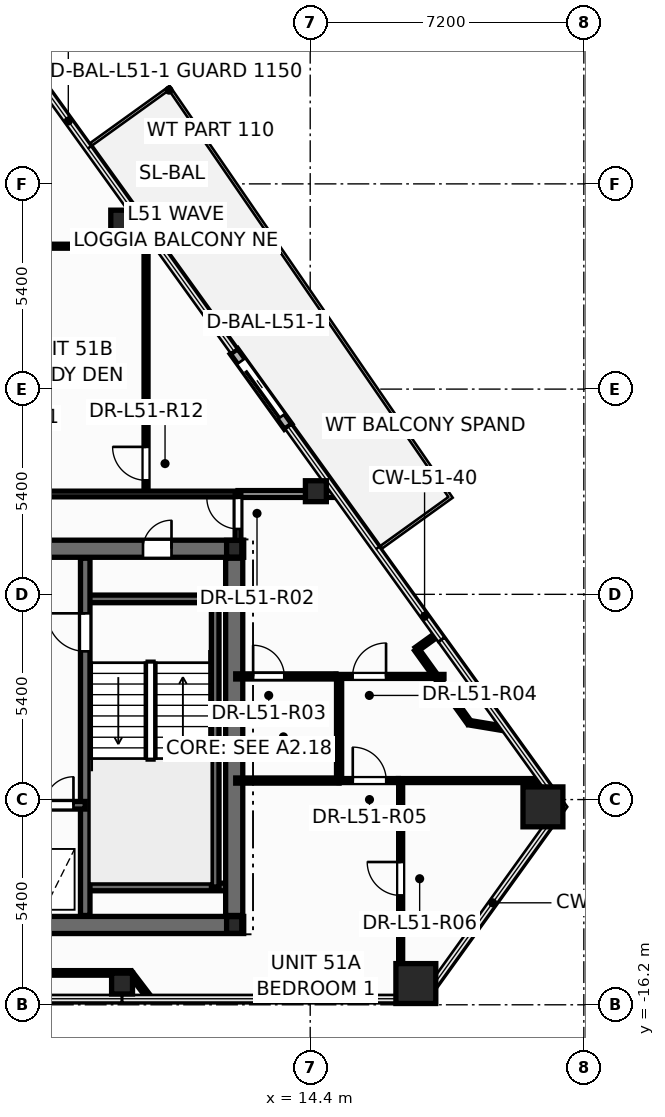
"""IFC4 building model, lengths in metres.
Left out: names, types, materials, properties, quantities, classifications, styles, units other than length and angle.
Written with IfcOpenShell. Run it as: python <this file> out.ifc"""

import sys

from ifc_helpers import new_model, si_unit, direction, frame, frame_2d, origin, origin_2d, place, context, subcontext, project, spatial, rectangle, hollow_rectangle, hollow_circle, i_section, extrude, element, fill, save


model = new_model("IFC4")
c1 = context("Model", 3, precision=1e-05, world=origin(), true_north=direction((0.0, 1.0)))
c2 = subcontext(c1, "Body", "Model", "MODEL_VIEW")
j1 = project(units=[si_unit("LENGTHUNIT", "METRE"), si_unit("PLANEANGLEUNIT", "RADIAN")], contexts=[c1])
p1 = place(None, origin())
s1 = spatial("IfcSite", under=j1, at=p1, CompositionType="ELEMENT")
p2 = place(p1, origin())
s2 = spatial("IfcBuilding", under=s1, at=p2, CompositionType="ELEMENT")
p3 = place(p2, frame((0.0, 0.0, 196.5)))
s3 = spatial("IfcBuildingStorey", under=s2, at=p3, CompositionType="ELEMENT", Elevation=196.5)
for number, where, z_axis, x_axis in (
    (1, (17.18, -15.641, 0.0), (0.0, 0.0, 1.0), (1.0, 0.0, 0.0)),
    (2, (20.524, -10.992, 0.0), (0.0, 0.0, 1.0), (1.0, 0.0, 0.0)),
):
    element("IfcColumn", number, at=place(p3, frame(where, z_axis=z_axis, x_axis=x_axis)), inside=s3, PredefinedType="COLUMN", context=c2, shape_type="SweptSolid", body=[
        extrude(hollow_rectangle(XDim=1.05, YDim=1.05, WallThickness=0.045, at=origin_2d()), origin(), (0.0, 0.0, 1.0), 3.6),
    ])
for number, where, z_axis, x_axis in (
    (3, (9.449, -15.641, 0.0), (0.0, 0.0, 1.0), (1.0, 0.0, 0.0)),
    (4, (14.549, -2.686, 0.0), (0.0, 0.0, 1.0), (1.0, 0.0, 0.0)),
    (5, (9.427, 4.433, 0.0), (0.0, 0.0, 1.0), (1.0, 0.0, 0.0)),
):
    element("IfcColumn", number, at=place(p3, frame(where, z_axis=z_axis, x_axis=x_axis)), inside=s3, PredefinedType="COLUMN", context=c2, shape_type="SweptSolid", body=[
        extrude(hollow_circle(Radius=0.275, WallThickness=0.024, at=origin_2d()), origin(), (0.0, 0.0, 1.0), 3.6),
    ])
for number, where, z_axis, x_axis in (
    (6, (12.4, -14.1, 0.0), (0.0, 0.0, 1.0), (1.0, 0.0, 0.0)),
    (7, (12.4, -4.2, 0.0), (0.0, 0.0, 1.0), (1.0, 0.0, 0.0)),
):
    element("IfcColumn", number, at=place(p3, frame(where, z_axis=z_axis, x_axis=x_axis)), inside=s3, PredefinedType="COLUMN", context=c2, shape_type="SweptSolid", body=[
        extrude(i_section(OverallWidth=0.4, OverallDepth=0.44, WebThickness=0.028, FlangeThickness=0.04, at=origin_2d()), origin(), (0.0, 0.0, 1.0), 3.6),
    ])
p4 = place(p3, frame((13.819, -0.987, -0.015), z_axis=(0.0, 0.0, 1.0), x_axis=(-0.583951454754, 0.811788579921, 0.0)))
e8 = element("IfcWall", 8, at=p4, inside=s3, PredefinedType="STANDARD", context=c2, shape_type="SweptSolid", body=[
    extrude(rectangle(XDim=2.44, YDim=0.24, at=frame_2d((1.22, 0.0))), origin(), (0.0, 0.0, 1.0), 2.807),
])
p5 = place(p4, frame((0.32, 0.0, 0.015)))
e9 = element("IfcOpeningElement", 9, at=p5, cuts=e8, PredefinedType="OPENING", context=c2, shape_type="SweptSolid", body=[
    extrude(rectangle(XDim=1.806, YDim=2.204, at=frame_2d((0.9, 1.102))), frame((0.0, 0.13, 0.0), z_axis=(0.0, -1.0, 0.0), x_axis=(1.0, 0.0, 0.0)), (0.0, 0.0, 1.0), 0.26),
])
p6 = place(p3, frame((-12.65, -14.1, 0.0), z_axis=(0.0, 0.0, 1.0), x_axis=(1.0, 0.0, 0.0)))
e10 = element("IfcWall", 10, at=p6, inside=s3, PredefinedType="SHEAR", context=c2, shape_type="SweptSolid", body=[
    extrude(rectangle(XDim=25.3, YDim=0.45, at=frame_2d((12.65, 0.0))), origin(), (0.0, 0.0, 1.0), 3.6),
])
p7 = place(p3, frame((-12.65, -4.2, 0.0), z_axis=(0.0, 0.0, 1.0), x_axis=(1.0, 0.0, 0.0)))
e11 = element("IfcWall", 11, at=p7, inside=s3, PredefinedType="SHEAR", context=c2, shape_type="SweptSolid", body=[
    extrude(rectangle(XDim=25.3, YDim=0.45, at=frame_2d((12.65, 0.0))), origin(), (0.0, 0.0, 1.0), 3.6),
])
p8 = place(p7, frame((1.85, 0.0, 0.0)))
e12 = element("IfcOpeningElement", 12, at=p8, cuts=e11, PredefinedType="OPENING", context=c2, shape_type="SweptSolid", body=[
    extrude(rectangle(XDim=0.756, YDim=2.054, at=frame_2d((0.375, 1.027))), frame((0.0, 0.235, 0.0), z_axis=(0.0, -1.0, 0.0), x_axis=(1.0, 0.0, 0.0)), (0.0, 0.0, 1.0), 0.47),
])
p9 = place(p7, frame((22.65, 0.0, 0.0)))
e13 = element("IfcOpeningElement", 13, at=p9, cuts=e11, PredefinedType="OPENING", context=c2, shape_type="SweptSolid", body=[
    extrude(rectangle(XDim=0.756, YDim=2.054, at=frame_2d((0.375, 1.027))), frame((0.0, 0.235, 0.0), z_axis=(0.0, -1.0, 0.0), x_axis=(1.0, 0.0, 0.0)), (0.0, 0.0, 1.0), 0.47),
])
p10 = place(p7, frame((5.85, 0.0, 0.0)))
e14 = element("IfcOpeningElement", 14, at=p10, cuts=e11, PredefinedType="OPENING", context=c2, shape_type="SweptSolid", body=[
    extrude(rectangle(XDim=1.006, YDim=2.104, at=frame_2d((0.5, 1.052))), frame((0.0, 0.235, 0.0), z_axis=(0.0, -1.0, 0.0), x_axis=(1.0, 0.0, 0.0)), (0.0, 0.0, 1.0), 0.47),
])
p11 = place(p7, frame((10.35, 0.0, 0.0)))
e15 = element("IfcOpeningElement", 15, at=p11, cuts=e11, PredefinedType="OPENING", context=c2, shape_type="SweptSolid", body=[
    extrude(rectangle(XDim=1.406, YDim=2.154, at=frame_2d((0.7, 1.077))), frame((0.0, 0.235, 0.0), z_axis=(0.0, -1.0, 0.0), x_axis=(1.0, 0.0, 0.0)), (0.0, 0.0, 1.0), 0.47),
])
p12 = place(p7, frame((18.45, 0.0, 0.0)))
e16 = element("IfcOpeningElement", 16, at=p12, cuts=e11, PredefinedType="OPENING", context=c2, shape_type="SweptSolid", body=[
    extrude(rectangle(XDim=1.006, YDim=2.104, at=frame_2d((0.5, 1.052))), frame((0.0, 0.235, 0.0), z_axis=(0.0, -1.0, 0.0), x_axis=(1.0, 0.0, 0.0)), (0.0, 0.0, 1.0), 0.47),
])
for number, where, z_axis, x_axis in (
    (17, (8.48, -5.52, 0.0), (0.0, 0.0, 1.0), (1.0, 0.0, 0.0)),
    (18, (8.48, -13.1, 0.0), (0.0, 0.0, 1.0), (1.0, 0.0, 0.0)),
):
    element("IfcWall", number, at=place(p3, frame(where, z_axis=z_axis, x_axis=x_axis)), inside=s3, PredefinedType="SOLIDWALL", context=c2, shape_type="SweptSolid", body=[
        extrude(rectangle(XDim=3.87, YDim=0.2, at=frame_2d((1.935, 0.0))), origin(), (0.0, 0.0, 1.0), 3.6),
    ])
p13 = place(p3, frame((11.9, -13.1, 0.0), z_axis=(0.0, 0.0, 1.0), x_axis=(0.0, 1.0, 0.0)))
e19 = element("IfcWall", 19, at=p13, inside=s3, PredefinedType="SOLIDWALL", context=c2, shape_type="SweptSolid", body=[
    extrude(rectangle(XDim=7.58, YDim=0.2, at=frame_2d((3.79, 0.0))), origin(), (0.0, 0.0, 1.0), 3.6),
])
p14 = place(p3, frame((8.48, -13.85, 0.0), z_axis=(0.0, 0.0, 1.0), x_axis=(0.0, 1.0, 0.0)))
e20 = element("IfcWall", 20, at=p14, inside=s3, PredefinedType="SHEAR", context=c2, shape_type="SweptSolid", body=[
    extrude(rectangle(XDim=9.4, YDim=0.25, at=frame_2d((4.7, 0.0))), origin(), (0.0, 0.0, 1.0), 3.6),
])
p15 = place(p14, frame((6.95, 0.0, 0.0)))
e21 = element("IfcOpeningElement", 21, at=p15, cuts=e20, PredefinedType="OPENING", context=c2, shape_type="SweptSolid", body=[
    extrude(rectangle(XDim=1.006, YDim=2.104, at=frame_2d((0.5, 1.052))), frame((0.0, 0.135, 0.0), z_axis=(0.0, -1.0, 0.0), x_axis=(1.0, 0.0, 0.0)), (0.0, 0.0, 1.0), 0.27),
])
p16 = place(p3, frame((5.12, -10.95, 0.0), z_axis=(0.0, 0.0, 1.0), x_axis=(1.0, 0.0, 0.0)))
e22 = element("IfcWall", 22, at=p16, inside=s3, PredefinedType="SOLIDWALL", context=c2, shape_type="SweptSolid", body=[
    extrude(rectangle(XDim=3.36, YDim=0.2, at=frame_2d((1.68, 0.0))), origin(), (0.0, 0.0, 1.0), 3.6),
])
p17 = place(p16, frame((0.42, 0.0, 0.0)))
e23 = element("IfcOpeningElement", 23, at=p17, cuts=e22, PredefinedType="OPENING", context=c2, shape_type="SweptSolid", body=[
    extrude(rectangle(XDim=1.106, YDim=2.104, at=frame_2d((0.55, 1.052))), frame((0.0, 0.11, 0.0), z_axis=(0.0, -1.0, 0.0), x_axis=(1.0, 0.0, 0.0)), (0.0, 0.0, 1.0), 0.22),
])
p18 = place(p16, frame((2.3, 0.0, 0.0)))
e24 = element("IfcOpeningElement", 24, at=p18, cuts=e22, PredefinedType="OPENING", context=c2, shape_type="SweptSolid", body=[
    extrude(rectangle(XDim=0.756, YDim=2.054, at=frame_2d((0.375, 1.027))), frame((0.0, 0.11, 0.0), z_axis=(0.0, -1.0, 0.0), x_axis=(1.0, 0.0, 0.0)), (0.0, 0.0, 1.0), 0.22),
])
p19 = place(p3, frame((12.4, -13.85, 0.0), z_axis=(0.0, 0.0, 1.0), x_axis=(0.0, 1.0, 0.0)))
e25 = element("IfcWall", 25, at=p19, inside=s3, PredefinedType="SHEAR", context=c2, shape_type="SweptSolid", body=[
    extrude(rectangle(XDim=9.4, YDim=0.45, at=frame_2d((4.7, 0.0))), origin(), (0.0, 0.0, 1.0), 3.6),
])
p20 = place(p3, frame((10.08, -2.76, 0.0), z_axis=(0.0, 0.0, 1.0), x_axis=(0.0, 1.0, 0.0)))
e26 = element("IfcWall", 26, at=p20, inside=s3, PredefinedType="PARTITIONING", context=c2, shape_type="SweptSolid", body=[
    extrude(rectangle(XDim=6.971, YDim=0.105, at=frame_2d((3.485, 0.0))), origin(), (0.0, 0.0, 1.0), 2.625),
])
p21 = place(p20, frame((0.36, 0.0, 0.0)))
e27 = element("IfcOpeningElement", 27, at=p21, cuts=e26, PredefinedType="OPENING", context=c2, shape_type="SweptSolid", body=[
    extrude(rectangle(XDim=0.886, YDim=2.104, at=frame_2d((0.44, 1.052))), frame((0.0, 0.062, 0.0), z_axis=(0.0, -1.0, 0.0), x_axis=(1.0, 0.0, 0.0)), (0.0, 0.0, 1.0), 0.125),
])
p22 = place(p3, frame((16.78, -16.041, 0.0), z_axis=(0.0, 0.0, 1.0), x_axis=(0.0, 1.0, 0.0)))
e28 = element("IfcWall", 28, at=p22, inside=s3, PredefinedType="PARTITIONING", context=c2, shape_type="SweptSolid", body=[
    extrude(rectangle(XDim=5.741, YDim=0.105, at=frame_2d((2.871, 0.0))), origin(), (0.0, 0.0, 1.0), 2.792),
])
p23 = place(p22, frame((2.718, 0.0, 0.0)))
e29 = element("IfcOpeningElement", 29, at=p23, cuts=e28, PredefinedType="OPENING", context=c2, shape_type="SweptSolid", body=[
    extrude(rectangle(XDim=0.886, YDim=2.104, at=frame_2d((0.44, 1.052))), frame((0.0, 0.062, 0.0), z_axis=(0.0, -1.0, 0.0), x_axis=(1.0, 0.0, 0.0)), (0.0, 0.0, 1.0), 0.125),
])
p24 = place(p3, frame((2.76, 3.76, 0.0), z_axis=(0.0, 0.0, 1.0), x_axis=(1.0, 0.0, 0.0)))
e30 = element("IfcWall", 30, at=p24, inside=s3, PredefinedType="PARTITIONING", context=c2, shape_type="SweptSolid", body=[
    extrude(rectangle(XDim=7.644, YDim=0.105, at=frame_2d((3.822, 0.0))), origin(), (0.0, 0.0, 1.0), 2.625),
])
p25 = place(p3, frame((5.822, -2.76, 0.0), z_axis=(0.0, 0.0, 1.0), x_axis=(1.0, 0.0, 0.0)))
e31 = element("IfcWall", 31, at=p25, inside=s3, PredefinedType="PARTITIONING", context=c2, shape_type="SweptSolid", body=[
    extrude(rectangle(XDim=6.678, YDim=0.15, at=frame_2d((3.339, 0.0))), origin(), (0.0, 0.0, 1.0), 2.325),
])
p26 = place(p3, frame((16.72, -10.3, 0.0), z_axis=(0.0, 0.0, 1.0), x_axis=(1.0, 0.0, 0.0)))
e32 = element("IfcWall", 32, at=p26, inside=s3, PredefinedType="PARTITIONING", context=c2, shape_type="SweptSolid", body=[
    extrude(rectangle(XDim=3.799, YDim=0.105, at=frame_2d((1.899, 0.0))), origin(), (0.0, 0.0, 1.0), 2.325),
])
p27 = place(p3, frame((5.958, -15.361, 0.0), z_axis=(0.0, 0.0, 1.0), x_axis=(1.0, 0.0, 0.0)))
e33 = element("IfcWall", 33, at=p27, inside=s3, PredefinedType="PARTITIONING", context=c2, shape_type="SweptSolid", body=[
    extrude(rectangle(XDim=3.711, YDim=0.12, at=frame_2d((1.855, 0.0))), origin(), (0.0, 0.0, 1.0), 2.792),
])
p28 = place(p3, frame((15.08, -7.56, 0.0), z_axis=(0.0, 0.0, 1.0), x_axis=(1.0, 0.0, 0.0)))
e34 = element("IfcWall", 34, at=p28, inside=s3, PredefinedType="PARTITIONING", context=c2, shape_type="SweptSolid", body=[
    extrude(rectangle(XDim=2.84, YDim=0.105, at=frame_2d((1.42, 0.0))), origin(), (0.0, 0.0, 1.0), 2.325),
])
p29 = place(p28, frame((0.436, 0.0, 0.0)))
e35 = element("IfcOpeningElement", 35, at=p29, cuts=e34, PredefinedType="OPENING", context=c2, shape_type="SweptSolid", body=[
    extrude(rectangle(XDim=0.886, YDim=2.104, at=frame_2d((0.44, 1.052))), frame((0.0, 0.062, 0.0), z_axis=(0.0, -1.0, 0.0), x_axis=(1.0, 0.0, 0.0)), (0.0, 0.0, 1.0), 0.125),
])
p30 = place(p3, frame((12.44, -7.56, 0.0), z_axis=(0.0, 0.0, 1.0), x_axis=(1.0, 0.0, 0.0)))
e36 = element("IfcWall", 36, at=p30, inside=s3, PredefinedType="PARTITIONING", context=c2, shape_type="SweptSolid", body=[
    extrude(rectangle(XDim=2.638, YDim=0.135, at=frame_2d((1.319, 0.0))), origin(), (0.0, 0.0, 1.0), 2.792),
])
p31 = place(p30, frame((0.458, 0.0, 0.0)))
e37 = element("IfcOpeningElement", 37, at=p31, cuts=e36, PredefinedType="OPENING", context=c2, shape_type="SweptSolid", body=[
    extrude(rectangle(XDim=0.826, YDim=2.104, at=frame_2d((0.41, 1.052))), frame((0.0, 0.078, 0.0), z_axis=(0.0, -1.0, 0.0), x_axis=(1.0, 0.0, 0.0)), (0.0, 0.0, 1.0), 0.155),
])
p32 = place(p3, frame((15.16, -10.3, 0.0), z_axis=(0.0, 0.0, 1.0), x_axis=(0.0, 1.0, 0.0)))
e38 = element("IfcWall", 38, at=p32, inside=s3, PredefinedType="PARTITIONING", context=c2, shape_type="SweptSolid", body=[
    extrude(rectangle(XDim=2.74, YDim=0.135, at=frame_2d((1.37, 0.0))), origin(), (0.0, 0.0, 1.0), 3.35),
])
p33 = place(p3, frame((12.44, -10.3, 0.0), z_axis=(0.0, 0.0, 1.0), x_axis=(1.0, 0.0, 0.0)))
e39 = element("IfcWall", 39, at=p33, inside=s3, PredefinedType="PARTITIONING", context=c2, shape_type="SweptSolid", body=[
    extrude(rectangle(XDim=2.72, YDim=0.135, at=frame_2d((1.36, 0.0))), origin(), (0.0, 0.0, 1.0), 2.792),
])
p34 = place(p3, frame((12.5, -2.76, 0.0), z_axis=(0.0, 0.0, 1.0), x_axis=(1.0, 0.0, 0.0)))
e40 = element("IfcWall", 40, at=p34, inside=s3, PredefinedType="PARTITIONING", context=c2, shape_type="SweptSolid", body=[
    extrude(rectangle(XDim=2.595, YDim=0.18, at=frame_2d((1.297, 0.0))), origin(), (0.0, 0.0, 1.0), 2.625),
])
p35 = place(p3, frame((18.586, -8.778, 0.0), z_axis=(0.0, 0.0, 1.0), x_axis=(-0.583963896956, 0.811779629611, 0.0)))
e41 = element("IfcWall", 41, at=p35, inside=s3, PredefinedType="PARTITIONING", context=c2, shape_type="SweptSolid", body=[
    extrude(rectangle(XDim=2.378, YDim=0.12, at=frame_2d((1.189, 0.0))), origin(), (0.0, 0.0, 1.0), 3.35),
])
p36 = place(p3, frame((15.16, -10.3, 0.0), z_axis=(0.0, 0.0, 1.0), x_axis=(1.0, 0.0, 0.0)))
e42 = element("IfcWall", 42, at=p36, inside=s3, PredefinedType="PARTITIONING", context=c2, shape_type="SweptSolid", body=[
    extrude(rectangle(XDim=1.558, YDim=0.105, at=frame_2d((0.779, 0.0))), origin(), (0.0, 0.0, 1.0), 3.35),
])
p37 = place(p36, frame((0.36, 0.0, 0.0)))
e43 = element("IfcOpeningElement", 43, at=p37, cuts=e42, PredefinedType="OPENING", context=c2, shape_type="SweptSolid", body=[
    extrude(rectangle(XDim=0.886, YDim=2.104, at=frame_2d((0.44, 1.052))), frame((0.0, 0.062, 0.0), z_axis=(0.0, -1.0, 0.0), x_axis=(1.0, 0.0, 0.0)), (0.0, 0.0, 1.0), 0.125),
])
p38 = place(p3, frame((12.5, -4.24, 0.0), z_axis=(0.0, 0.0, 1.0), x_axis=(0.0, 1.0, 0.0)))
e44 = element("IfcWall", 44, at=p38, inside=s3, PredefinedType="PARTITIONING", context=c2, shape_type="SweptSolid", body=[
    extrude(rectangle(XDim=1.48, YDim=0.15, at=frame_2d((0.74, 0.0))), origin(), (0.0, 0.0, 1.0), 2.325),
])
p39 = place(p38, frame((0.56, 0.0, 0.0)))
e45 = element("IfcOpeningElement", 45, at=p39, cuts=e44, PredefinedType="OPENING", context=c2, shape_type="SweptSolid", body=[
    extrude(rectangle(XDim=0.826, YDim=2.104, at=frame_2d((0.41, 1.052))), frame((0.0, 0.085, 0.0), z_axis=(0.0, -1.0, 0.0), x_axis=(1.0, 0.0, 0.0)), (0.0, 0.0, 1.0), 0.17),
])
p40 = place(p3, frame((19.424, -8.917, 0.0), z_axis=(0.0, 0.0, 1.0), x_axis=(-0.98640168839, 0.164352393172, 0.0)))
e46 = element("IfcWall", 46, at=p40, inside=s3, PredefinedType="PARTITIONING", context=c2, shape_type="SweptSolid", body=[
    extrude(rectangle(XDim=0.85, YDim=0.12, at=frame_2d((0.425, 0.0))), origin(), (0.0, 0.0, 1.0), 2.792),
])
p41 = place(p3, frame((9.669, -15.361, 0.0), z_axis=(0.0, 0.0, 1.0), x_axis=(0.605553776309, -0.795804388023, 0.0)))
e47 = element("IfcWall", 47, at=p41, inside=s3, PredefinedType="PARTITIONING", context=c2, shape_type="SweptSolid", body=[
    extrude(rectangle(XDim=0.842, YDim=0.12, at=frame_2d((0.421, 0.0))), origin(), (0.0, 0.0, 1.0), 2.792),
])
p42 = place(p3, frame((17.198, -6.847, 0.0), z_axis=(0.0, 0.0, 1.0), x_axis=(0.811783169955, 0.583958975423, 0.0)))
e48 = element("IfcWall", 48, at=p42, inside=s3, PredefinedType="PARTITIONING", context=c2, shape_type="SweptSolid", body=[
    extrude(rectangle(XDim=0.67, YDim=0.12, at=frame_2d((0.335, 0.0))), origin(), (0.0, 0.0, 1.0), 2.792),
])
p43 = place(p5, origin())
e49 = element("IfcDoor", 49, at=p43, inside=s3, OperationType="SLIDING_TO_LEFT", PredefinedType="DOOR", context=c2, shape_type="SweptSolid", body=[
    extrude(rectangle(XDim=1.8, YDim=2.2, at=frame_2d((0.9, 1.1))), frame((0.0, 0.025, 0.0), z_axis=(0.0, -1.0, 0.0), x_axis=(1.0, 0.0, 0.0)), (0.0, 0.0, 1.0), 0.05),
])
fill(e9, e49)
p44 = place(p15, origin())
e50 = element("IfcDoor", 50, at=p44, inside=s3, OperationType="SINGLE_SWING_RIGHT", PredefinedType="DOOR", context=c2, shape_type="SweptSolid", body=[
    extrude(rectangle(XDim=1.0, YDim=2.1, at=frame_2d((0.5, 1.05))), frame((0.0, 0.025, 0.0), z_axis=(0.0, -1.0, 0.0), x_axis=(1.0, 0.0, 0.0)), (0.0, 0.0, 1.0), 0.05),
])
fill(e21, e50)
p45 = place(p18, origin())
e51 = element("IfcDoor", 51, at=p45, inside=s3, OperationType="SINGLE_SWING_RIGHT", PredefinedType="DOOR", context=c2, shape_type="SweptSolid", body=[
    extrude(rectangle(XDim=0.75, YDim=2.05, at=frame_2d((0.375, 1.025))), frame((0.0, 0.025, 0.0), z_axis=(0.0, -1.0, 0.0), x_axis=(1.0, 0.0, 0.0)), (0.0, 0.0, 1.0), 0.05),
])
fill(e24, e51)
p46 = place(p9, origin())
e52 = element("IfcDoor", 52, at=p46, inside=s3, OperationType="SINGLE_SWING_RIGHT", PredefinedType="DOOR", context=c2, shape_type="SweptSolid", body=[
    extrude(rectangle(XDim=0.75, YDim=2.05, at=frame_2d((0.375, 1.025))), frame((0.0, 0.025, 0.0), z_axis=(0.0, -1.0, 0.0), x_axis=(1.0, 0.0, 0.0)), (0.0, 0.0, 1.0), 0.05),
])
fill(e13, e52)
p47 = place(p39, origin())
e53 = element("IfcDoor", 53, at=p47, inside=s3, OperationType="SINGLE_SWING_RIGHT", PredefinedType="DOOR", context=c2, shape_type="SweptSolid", body=[
    extrude(rectangle(XDim=0.82, YDim=2.1, at=frame_2d((0.41, 1.05))), frame((0.0, 0.025, 0.0), z_axis=(0.0, -1.0, 0.0), x_axis=(1.0, 0.0, 0.0)), (0.0, 0.0, 1.0), 0.05),
])
fill(e45, e53)
p48 = place(p31, origin())
e54 = element("IfcDoor", 54, at=p48, inside=s3, OperationType="SINGLE_SWING_LEFT", PredefinedType="DOOR", context=c2, shape_type="SweptSolid", body=[
    extrude(rectangle(XDim=0.82, YDim=2.1, at=frame_2d((0.41, 1.05))), frame((0.0, 0.025, 0.0), z_axis=(0.0, -1.0, 0.0), x_axis=(1.0, 0.0, 0.0)), (0.0, 0.0, 1.0), 0.05),
])
fill(e37, e54)
p49 = place(p29, origin())
e55 = element("IfcDoor", 55, at=p49, inside=s3, OperationType="SINGLE_SWING_RIGHT", PredefinedType="DOOR", context=c2, shape_type="SweptSolid", body=[
    extrude(rectangle(XDim=0.88, YDim=2.1, at=frame_2d((0.44, 1.05))), frame((0.0, 0.025, 0.0), z_axis=(0.0, -1.0, 0.0), x_axis=(1.0, 0.0, 0.0)), (0.0, 0.0, 1.0), 0.05),
])
fill(e35, e55)
p50 = place(p37, origin())
e56 = element("IfcDoor", 56, at=p50, inside=s3, OperationType="SINGLE_SWING_LEFT", PredefinedType="DOOR", context=c2, shape_type="SweptSolid", body=[
    extrude(rectangle(XDim=0.88, YDim=2.1, at=frame_2d((0.44, 1.05))), frame((0.0, 0.025, 0.0), z_axis=(0.0, -1.0, 0.0), x_axis=(1.0, 0.0, 0.0)), (0.0, 0.0, 1.0), 0.05),
])
fill(e43, e56)
p51 = place(p23, origin())
e57 = element("IfcDoor", 57, at=p51, inside=s3, OperationType="SINGLE_SWING_RIGHT", PredefinedType="DOOR", context=c2, shape_type="SweptSolid", body=[
    extrude(rectangle(XDim=0.88, YDim=2.1, at=frame_2d((0.44, 1.05))), frame((0.0, 0.025, 0.0), z_axis=(0.0, -1.0, 0.0), x_axis=(1.0, 0.0, 0.0)), (0.0, 0.0, 1.0), 0.05),
])
fill(e29, e57)
p52 = place(p21, origin())
e58 = element("IfcDoor", 58, at=p52, inside=s3, OperationType="SINGLE_SWING_RIGHT", PredefinedType="DOOR", context=c2, shape_type="SweptSolid", body=[
    extrude(rectangle(XDim=0.88, YDim=2.1, at=frame_2d((0.44, 1.05))), frame((0.0, 0.025, 0.0), z_axis=(0.0, -1.0, 0.0), x_axis=(1.0, 0.0, 0.0)), (0.0, 0.0, 1.0), 0.05),
])
fill(e27, e58)
save(model, sys.argv[1])
